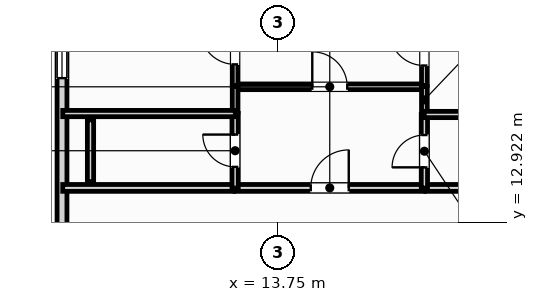
"""IFC4 building model, lengths in metres.
Left out: names, types, materials, properties, quantities, classifications, styles, units other than length and angle.
Written with IfcOpenShell. Run it as: python <this file> out.ifc"""

import sys

from ifc_helpers import new_model, si_unit, direction, frame, frame_2d, origin, place, context, subcontext, project, spatial, rectangle, extrude, element, fill, save


model = new_model("IFC4")
c1 = context("Model", 3, precision=1e-05, world=origin(), true_north=direction((0.0, 1.0)))
c2 = subcontext(c1, "Body", "Model", "MODEL_VIEW")
j1 = project(units=[si_unit("LENGTHUNIT", "METRE"), si_unit("PLANEANGLEUNIT", "RADIAN")], contexts=[c1])
p1 = place(None, origin())
s1 = spatial("IfcSite", under=j1, at=p1, CompositionType="ELEMENT")
p2 = place(p1, origin())
s2 = spatial("IfcBuilding", under=s1, at=p2, CompositionType="ELEMENT")
p3 = place(p2, frame((0.0, 0.0, 256.75)))
s3 = spatial("IfcBuildingStorey", under=s2, at=p3, CompositionType="ELEMENT", Elevation=256.75)
p4 = place(p3, frame((8.057, 32.726, 0.0), z_axis=(0.0, 0.0, 1.0), x_axis=(0.0, -1.0, 0.0)))
e1 = element("IfcWall", 1, at=p4, inside=s3, PredefinedType="SOLIDWALL", context=c2, shape_type="SweptSolid", body=[
    extrude(rectangle(XDim=29.486, YDim=0.26, at=frame_2d((14.743, 0.0))), origin(), (0.0, 0.0, 1.0), 3.19),
])
p5 = place(p4, frame((24.186, 0.0, 0.85)))
e2 = element("IfcOpeningElement", 2, at=p5, cuts=e1, PredefinedType="OPENING", context=c2, shape_type="SweptSolid", body=[
    extrude(rectangle(XDim=0.9, YDim=1.4, at=frame_2d((0.45, 0.7))), frame((0.0, 0.14, 0.0), z_axis=(0.0, -1.0, 0.0), x_axis=(1.0, 0.0, 0.0)), (0.0, 0.0, 1.0), 0.28),
])
p6 = place(p4, frame((4.526, 0.0, 0.85)))
e3 = element("IfcOpeningElement", 3, at=p6, cuts=e1, PredefinedType="OPENING", context=c2, shape_type="SweptSolid", body=[
    extrude(rectangle(XDim=0.9, YDim=1.4, at=frame_2d((0.45, 0.7))), frame((0.0, 0.14, 0.0), z_axis=(0.0, -1.0, 0.0), x_axis=(1.0, 0.0, 0.0)), (0.0, 0.0, 1.0), 0.28),
])
p7 = place(p4, frame((15.108, 0.0, 0.85)))
e4 = element("IfcOpeningElement", 4, at=p7, cuts=e1, PredefinedType="OPENING", context=c2, shape_type="SweptSolid", body=[
    extrude(rectangle(XDim=0.9, YDim=1.4, at=frame_2d((0.45, 0.7))), frame((0.0, 0.14, 0.0), z_axis=(0.0, -1.0, 0.0), x_axis=(1.0, 0.0, 0.0)), (0.0, 0.0, 1.0), 0.28),
])
p8 = place(p4, frame((9.501, 0.0, 0.85)))
e5 = element("IfcOpeningElement", 5, at=p8, cuts=e1, PredefinedType="OPENING", context=c2, shape_type="SweptSolid", body=[
    extrude(rectangle(XDim=0.9, YDim=1.4, at=frame_2d((0.45, 0.7))), frame((0.0, 0.14, 0.0), z_axis=(0.0, -1.0, 0.0), x_axis=(1.0, 0.0, 0.0)), (0.0, 0.0, 1.0), 0.28),
])
p9 = place(p3, frame((12.607, 13.83, 0.0), z_axis=(0.0, 0.0, 1.0), x_axis=(1.0, 0.0, 0.0)))
e6 = element("IfcWall", 6, at=p9, inside=s3, PredefinedType="PARTITIONING", context=c2, shape_type="SweptSolid", body=[
    extrude(rectangle(XDim=4.99, YDim=0.18, at=frame_2d((2.495, 0.0))), origin(), (0.0, 0.0, 1.0), 3.65),
])
p10 = place(p9, frame((1.995, 0.0, 0.0)))
e7 = element("IfcOpeningElement", 7, at=p10, cuts=e6, PredefinedType="OPENING", context=c2, shape_type="SweptSolid", body=[
    extrude(rectangle(XDim=1.0, YDim=2.15, at=frame_2d((0.5, 1.075))), frame((0.0, 0.1, 0.0), z_axis=(0.0, -1.0, 0.0), x_axis=(1.0, 0.0, 0.0)), (0.0, 0.0, 1.0), 0.2),
])
p11 = place(p3, frame((8.076, 13.83, 0.0), z_axis=(0.0, 0.0, 1.0), x_axis=(1.0, 0.0, 0.0)))
e8 = element("IfcWall", 8, at=p11, inside=s3, PredefinedType="PARTITIONING", context=c2, shape_type="SweptSolid", body=[
    extrude(rectangle(XDim=4.501, YDim=0.18, at=frame_2d((2.25, 0.0))), origin(), (0.0, 0.0, 1.0), 3.65),
])
p12 = place(p3, frame((17.627, 13.83, 0.0), z_axis=(0.0, 0.0, 1.0), x_axis=(1.0, 0.0, 0.0)))
e9 = element("IfcWall", 9, at=p12, inside=s3, PredefinedType="PARTITIONING", context=c2, shape_type="SweptSolid", body=[
    extrude(rectangle(XDim=3.918, YDim=0.18, at=frame_2d((1.959, 0.0))), origin(), (0.0, 0.0, 1.0), 3.65),
])
p13 = place(p3, frame((12.607, 16.49, 0.0), z_axis=(0.0, 0.0, 1.0), x_axis=(1.0, 0.0, 0.0)))
e10 = element("IfcWall", 10, at=p13, inside=s3, PredefinedType="PARTITIONING", context=c2, shape_type="SweptSolid", body=[
    extrude(rectangle(XDim=4.99, YDim=0.15, at=frame_2d((2.495, 0.0))), origin(), (0.0, 0.0, 1.0), 3.65),
])
p14 = place(p13, frame((2.035, 0.0, 0.0)))
e11 = element("IfcOpeningElement", 11, at=p14, cuts=e10, PredefinedType="OPENING", context=c2, shape_type="SweptSolid", body=[
    extrude(rectangle(XDim=0.92, YDim=2.1, at=frame_2d((0.46, 1.05))), frame((0.0, 0.085, 0.0), z_axis=(0.0, -1.0, 0.0), x_axis=(1.0, 0.0, 0.0)), (0.0, 0.0, 1.0), 0.17),
])
p15 = place(p3, frame((12.612, 13.825, 0.0), z_axis=(0.0, 0.0, 1.0), x_axis=(0.0, 1.0, 0.0)))
e12 = element("IfcWall", 12, at=p15, inside=s3, PredefinedType="PLUMBINGWALL", context=c2, shape_type="SweptSolid", body=[
    extrude(rectangle(XDim=1.967, YDim=0.165, at=frame_2d((0.983, 0.0))), origin(), (0.0, 0.0, 1.0), 3.65),
])
p16 = place(p15, frame((0.558, 0.0, 0.0)))
e13 = element("IfcOpeningElement", 13, at=p16, cuts=e12, PredefinedType="OPENING", context=c2, shape_type="SweptSolid", body=[
    extrude(rectangle(XDim=0.85, YDim=2.1, at=frame_2d((0.425, 1.05))), frame((0.0, 0.093, 0.0), z_axis=(0.0, -1.0, 0.0), x_axis=(1.0, 0.0, 0.0)), (0.0, 0.0, 1.0), 0.185),
])
p17 = place(p3, frame((12.612, 15.821, 0.0), z_axis=(0.0, 0.0, 1.0), x_axis=(0.0, 1.0, 0.0)))
e14 = element("IfcWall", 14, at=p17, inside=s3, PredefinedType="PARTITIONING", context=c2, shape_type="SweptSolid", body=[
    extrude(rectangle(XDim=0.674, YDim=0.15, at=frame_2d((0.337, 0.0))), origin(), (0.0, 0.0, 1.0), 3.65),
])
p18 = place(p3, frame((17.592, 13.825, 0.0), z_axis=(0.0, 0.0, 1.0), x_axis=(0.0, 1.0, 0.0)))
e15 = element("IfcWall", 15, at=p18, inside=s3, PredefinedType="PLUMBINGWALL", context=c2, shape_type="SweptSolid", body=[
    extrude(rectangle(XDim=1.942, YDim=0.165, at=frame_2d((0.971, 0.0))), origin(), (0.0, 0.0, 1.0), 3.65),
])
p19 = place(p18, frame((0.546, 0.0, 0.0)))
e16 = element("IfcOpeningElement", 16, at=p19, cuts=e15, PredefinedType="OPENING", context=c2, shape_type="SweptSolid", body=[
    extrude(rectangle(XDim=0.85, YDim=2.1, at=frame_2d((0.425, 1.05))), frame((0.0, 0.093, 0.0), z_axis=(0.0, -1.0, 0.0), x_axis=(1.0, 0.0, 0.0)), (0.0, 0.0, 1.0), 0.185),
])
p20 = place(p3, frame((17.592, 15.797, 0.0), z_axis=(0.0, 0.0, 1.0), x_axis=(0.0, 1.0, 0.0)))
e17 = element("IfcWall", 17, at=p20, inside=s3, PredefinedType="PARTITIONING", context=c2, shape_type="SweptSolid", body=[
    extrude(rectangle(XDim=0.699, YDim=0.15, at=frame_2d((0.349, 0.0))), origin(), (0.0, 0.0, 1.0), 3.65),
])
p21 = place(p3, frame((12.612, 16.525, 0.0), z_axis=(0.0, 0.0, 1.0), x_axis=(0.0, 1.0, 0.0)))
e18 = element("IfcWall", 18, at=p21, inside=s3, PredefinedType="PARTITIONING", context=c2, shape_type="SweptSolid", body=[
    extrude(rectangle(XDim=2.03, YDim=0.15, at=frame_2d((1.015, 0.0))), origin(), (0.0, 0.0, 1.0), 3.65),
])
p22 = place(p21, frame((0.555, 0.0, 0.0)))
e19 = element("IfcOpeningElement", 19, at=p22, cuts=e18, PredefinedType="OPENING", context=c2, shape_type="SweptSolid", body=[
    extrude(rectangle(XDim=0.92, YDim=2.1, at=frame_2d((0.46, 1.05))), frame((0.0, 0.085, 0.0), z_axis=(0.0, -1.0, 0.0), x_axis=(1.0, 0.0, 0.0)), (0.0, 0.0, 1.0), 0.17),
])
p23 = place(p3, frame((17.592, 16.525, 0.0), z_axis=(0.0, 0.0, 1.0), x_axis=(0.0, 1.0, 0.0)))
e20 = element("IfcWall", 20, at=p23, inside=s3, PredefinedType="PARTITIONING", context=c2, shape_type="SweptSolid", body=[
    extrude(rectangle(XDim=1.969, YDim=0.15, at=frame_2d((0.984, 0.0))), origin(), (0.0, 0.0, 1.0), 3.65),
])
p24 = place(p23, frame((0.524, 0.0, 0.0)))
e21 = element("IfcOpeningElement", 21, at=p24, cuts=e20, PredefinedType="OPENING", context=c2, shape_type="SweptSolid", body=[
    extrude(rectangle(XDim=0.92, YDim=2.1, at=frame_2d((0.46, 1.05))), frame((0.0, 0.085, 0.0), z_axis=(0.0, -1.0, 0.0), x_axis=(1.0, 0.0, 0.0)), (0.0, 0.0, 1.0), 0.17),
])
p25 = place(p3, frame((8.076, 15.786, 0.0), z_axis=(0.0, 0.0, 1.0), x_axis=(1.0, 0.0, 0.0)))
e22 = element("IfcWall", 22, at=p25, inside=s3, PredefinedType="PLUMBINGWALL", context=c2, shape_type="SweptSolid", body=[
    extrude(rectangle(XDim=4.541, YDim=0.165, at=frame_2d((2.271, 0.0))), origin(), (0.0, 0.0, 1.0), 3.65),
])
p26 = place(p3, frame((17.587, 15.762, 0.0), z_axis=(0.0, 0.0, 1.0), x_axis=(1.0, 0.0, 0.0)))
e23 = element("IfcWall", 23, at=p26, inside=s3, PredefinedType="PLUMBINGWALL", context=c2, shape_type="SweptSolid", body=[
    extrude(rectangle(XDim=3.958, YDim=0.165, at=frame_2d((1.979, 0.0))), origin(), (0.0, 0.0, 1.0), 3.65),
])
p27 = place(p3, frame((8.807, 13.995, 0.0), z_axis=(0.0, 0.0, 1.0), x_axis=(0.0, 1.0, 0.0)))
e24 = element("IfcWall", 24, at=p27, inside=s3, PredefinedType="PLUMBINGWALL", context=c2, shape_type="SweptSolid", body=[
    extrude(rectangle(XDim=1.626, YDim=0.165, at=frame_2d((0.813, 0.0))), origin(), (0.0, 0.0, 1.0), 3.65),
])
p28 = place(p7, origin())
e25 = element("IfcWindow", 25, at=p28, inside=s3, PartitioningType="SINGLE_PANEL", PredefinedType="WINDOW", context=c2, shape_type="SweptSolid", body=[
    extrude(rectangle(XDim=0.9, YDim=1.4, at=frame_2d((0.45, 0.7))), frame((0.0, 0.03, 0.0), z_axis=(0.0, -1.0, 0.0), x_axis=(1.0, 0.0, 0.0)), (0.0, 0.0, 1.0), 0.06),
])
fill(e4, e25)
p29 = place(p10, origin())
e26 = element("IfcDoor", 26, at=p29, inside=s3, OperationType="SINGLE_SWING_RIGHT", PredefinedType="DOOR", context=c2, shape_type="SweptSolid", body=[
    extrude(rectangle(XDim=1.0, YDim=2.15, at=frame_2d((0.5, 1.075))), frame((0.0, 0.025, 0.0), z_axis=(0.0, -1.0, 0.0), x_axis=(1.0, 0.0, 0.0)), (0.0, 0.0, 1.0), 0.05),
])
fill(e7, e26)
p30 = place(p14, origin())
e27 = element("IfcDoor", 27, at=p30, inside=s3, OperationType="SINGLE_SWING_LEFT", PredefinedType="DOOR", context=c2, shape_type="SweptSolid", body=[
    extrude(rectangle(XDim=0.92, YDim=2.1, at=frame_2d((0.46, 1.05))), frame((0.0, 0.025, 0.0), z_axis=(0.0, -1.0, 0.0), x_axis=(1.0, 0.0, 0.0)), (0.0, 0.0, 1.0), 0.05),
])
fill(e11, e27)
p31 = place(p16, origin())
e28 = element("IfcDoor", 28, at=p31, inside=s3, OperationType="SINGLE_SWING_RIGHT", PredefinedType="DOOR", context=c2, shape_type="SweptSolid", body=[
    extrude(rectangle(XDim=0.85, YDim=2.1, at=frame_2d((0.425, 1.05))), frame((0.0, 0.025, 0.0), z_axis=(0.0, -1.0, 0.0), x_axis=(1.0, 0.0, 0.0)), (0.0, 0.0, 1.0), 0.05),
])
fill(e13, e28)
p32 = place(p19, origin())
e29 = element("IfcDoor", 29, at=p32, inside=s3, OperationType="SINGLE_SWING_LEFT", PredefinedType="DOOR", context=c2, shape_type="SweptSolid", body=[
    extrude(rectangle(XDim=0.85, YDim=2.1, at=frame_2d((0.425, 1.05))), frame((0.0, 0.025, 0.0), z_axis=(0.0, -1.0, 0.0), x_axis=(1.0, 0.0, 0.0)), (0.0, 0.0, 1.0), 0.05),
])
fill(e16, e29)
p33 = place(p22, origin())
e30 = element("IfcDoor", 30, at=p33, inside=s3, OperationType="SINGLE_SWING_RIGHT", PredefinedType="DOOR", context=c2, shape_type="SweptSolid", body=[
    extrude(rectangle(XDim=0.92, YDim=2.1, at=frame_2d((0.46, 1.05))), frame((0.0, 0.025, 0.0), z_axis=(0.0, -1.0, 0.0), x_axis=(1.0, 0.0, 0.0)), (0.0, 0.0, 1.0), 0.05),
])
fill(e19, e30)
p34 = place(p24, origin())
e31 = element("IfcDoor", 31, at=p34, inside=s3, OperationType="SINGLE_SWING_RIGHT", PredefinedType="DOOR", context=c2, shape_type="SweptSolid", body=[
    extrude(rectangle(XDim=0.92, YDim=2.1, at=frame_2d((0.46, 1.05))), frame((0.0, 0.025, 0.0), z_axis=(0.0, -1.0, 0.0), x_axis=(1.0, 0.0, 0.0)), (0.0, 0.0, 1.0), 0.05),
])
fill(e21, e31)
save(model, sys.argv[1])
